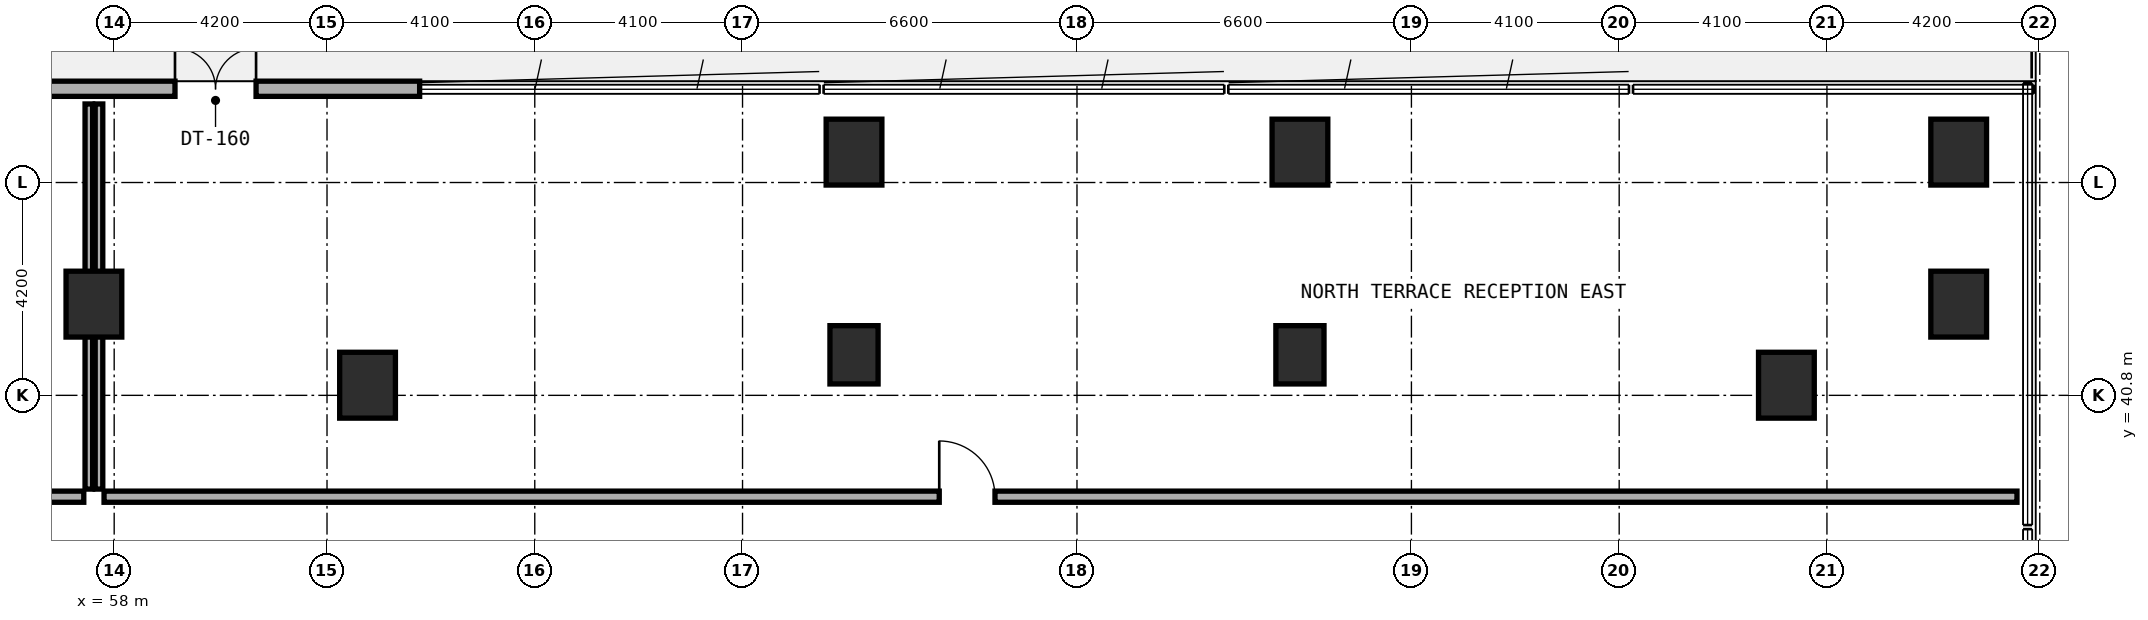
"""IFC4 building model, lengths in metres.
Left out: names, types, materials, properties, quantities, classifications, styles, units other than length and angle.
Written with IfcOpenShell. Run it as: python <this file> out.ifc"""

import sys

from ifc_helpers import new_model, si_unit, direction, frame, frame_2d, origin, origin_2d, place, context, subcontext, project, spatial, rectangle, extrude, element, fill, save


model = new_model("IFC4")
c1 = context("Model", 3, precision=1e-05, world=origin(), true_north=direction((0.0, 1.0)))
c2 = subcontext(c1, "Body", "Model", "MODEL_VIEW")
j1 = project(units=[si_unit("LENGTHUNIT", "METRE"), si_unit("PLANEANGLEUNIT", "RADIAN")], contexts=[c1])
p1 = place(None, origin())
s1 = spatial("IfcSite", under=j1, at=p1, CompositionType="ELEMENT")
p2 = place(p1, origin())
s2 = spatial("IfcBuilding", under=s1, at=p2, CompositionType="ELEMENT")
p3 = place(p2, frame((0.0, 0.0, 10.2)))
s3 = spatial("IfcBuildingStorey", under=s2, at=p3, CompositionType="ELEMENT", Elevation=10.2)
for number, where, z_axis, x_axis in (
    (1, (72.6, 41.6, 0.0), (0.0, 0.0, 1.0), (1.0, 0.0, 0.0)),
    (2, (81.4, 41.6, 0.0), (0.0, 0.0, 1.0), (1.0, 0.0, 0.0)),
):
    element("IfcColumn", number, at=place(p3, frame(where, z_axis=z_axis, x_axis=x_axis)), inside=s3, PredefinedType="COLUMN", context=c2, shape_type="SweptSolid", body=[
        extrude(rectangle(XDim=0.95, YDim=1.15, at=origin_2d()), origin(), (0.0, 0.0, 1.0), 4.8),
    ])
for number, where, z_axis, x_axis in (
    (3, (91.0, 41.0, 0.0), (0.0, 0.0, 1.0), (1.0, 0.0, 0.0)),
    (4, (63.0, 41.0, 0.0), (0.0, 0.0, 1.0), (1.0, 0.0, 0.0)),
    (5, (72.6, 45.6, 0.0), (0.0, 0.0, 1.0), (1.0, 0.0, 0.0)),
    (6, (81.4, 45.6, 0.0), (0.0, 0.0, 1.0), (1.0, 0.0, 0.0)),
    (7, (94.4, 45.6, 0.0), (0.0, 0.0, 1.0), (1.0, 0.0, 0.0)),
    (8, (57.6, 42.6, 0.0), (0.0, 0.0, 1.0), (1.0, 0.0, 0.0)),
    (9, (94.4, 42.6, 0.0), (0.0, 0.0, 1.0), (1.0, 0.0, 0.0)),
):
    element("IfcColumn", number, at=place(p3, frame(where, z_axis=z_axis, x_axis=x_axis)), inside=s3, PredefinedType="COLUMN", context=c2, shape_type="SweptSolid", body=[
        extrude(rectangle(XDim=1.1, YDim=1.3, at=origin_2d()), origin(), (0.0, 0.0, 1.0), 4.8),
    ])
p4 = place(p3, frame((64.028, 46.85, 0.0), z_axis=(0.0, 0.0, 1.0), x_axis=(-1.0, 0.0, 0.0)))
e10 = element("IfcWall", 10, at=p4, inside=s3, PredefinedType="STANDARD", context=c2, shape_type="SweptSolid", body=[
    extrude(rectangle(XDim=8.096, YDim=0.3, at=frame_2d((4.048, 0.0))), origin(), (0.0, 0.0, 1.0), 4.45),
])
p5 = place(p4, frame((3.228, 0.0, 0.0)))
e11 = element("IfcOpeningElement", 11, at=p5, cuts=e10, PredefinedType="OPENING", context=c2, shape_type="SweptSolid", body=[
    extrude(rectangle(XDim=1.6, YDim=2.2, at=frame_2d((0.8, 1.1))), frame((0.0, 0.16, 0.0), z_axis=(0.0, -1.0, 0.0), x_axis=(1.0, 0.0, 0.0)), (0.0, 0.0, 1.0), 0.32),
])
p6 = place(p3, frame((57.5, 38.95, 0.0), z_axis=(0.0, 0.0, 1.0), x_axis=(0.0, 1.0, 0.0)))
e12 = element("IfcWall", 12, at=p6, inside=s3, PredefinedType="PARTITIONING", context=c2, shape_type="SweptSolid", body=[
    extrude(rectangle(XDim=7.6, YDim=0.15, at=frame_2d((3.8, 0.0))), origin(), (0.0, 0.0, 1.0), 3.625),
])
p7 = place(p3, frame((40.1, 38.8, 0.0), z_axis=(0.0, 0.0, 1.0), x_axis=(1.0, 0.0, 0.0)))
e13 = element("IfcWall", 13, at=p7, inside=s3, PredefinedType="SOLIDWALL", context=c2, shape_type="SweptSolid", body=[
    extrude(rectangle(XDim=17.3, YDim=0.22, at=frame_2d((8.65, 0.0))), origin(), (0.0, 0.0, 1.0), 3.725),
])
p8 = place(p7, frame((7.28, 0.0, 0.0)))
e14 = element("IfcOpeningElement", 14, at=p8, cuts=e13, PredefinedType="OPENING", context=c2, shape_type="SweptSolid", body=[
    extrude(rectangle(XDim=1.1, YDim=2.1, at=frame_2d((0.55, 1.05))), frame((0.0, 0.12, 0.0), z_axis=(0.0, -1.0, 0.0), x_axis=(1.0, 0.0, 0.0)), (0.0, 0.0, 1.0), 0.24),
])
p9 = place(p3, frame((57.7, 38.95, 0.0), z_axis=(0.0, 0.0, 1.0), x_axis=(0.0, 1.0, 0.0)))
e15 = element("IfcWall", 15, at=p9, inside=s3, PredefinedType="PARTITIONING", context=c2, shape_type="SweptSolid", body=[
    extrude(rectangle(XDim=7.6, YDim=0.15, at=frame_2d((3.8, 0.0))), origin(), (0.0, 0.0, 1.0), 3.725),
])
p10 = place(p3, frame((57.8, 38.8, 0.0), z_axis=(0.0, 0.0, 1.0), x_axis=(1.0, 0.0, 0.0)))
e16 = element("IfcWall", 16, at=p10, inside=s3, PredefinedType="SOLIDWALL", context=c2, shape_type="SweptSolid", body=[
    extrude(rectangle(XDim=37.75, YDim=0.22, at=frame_2d((18.875, 0.0))), origin(), (0.0, 0.0, 1.0), 3.925),
])
p11 = place(p10, frame((16.482, 0.0, 0.0)))
e17 = element("IfcOpeningElement", 17, at=p11, cuts=e16, PredefinedType="OPENING", context=c2, shape_type="SweptSolid", body=[
    extrude(rectangle(XDim=1.1, YDim=2.1, at=frame_2d((0.55, 1.05))), frame((0.0, 0.12, 0.0), z_axis=(0.0, -1.0, 0.0), x_axis=(1.0, 0.0, 0.0)), (0.0, 0.0, 1.0), 0.24),
])
p12 = place(p5, frame((1.6, 0.0, 0.0), z_axis=(0.0, 0.0, 1.0), x_axis=(-1.0, 0.0, 0.0)))
e18 = element("IfcDoor", 18, at=p12, inside=s3, OperationType="DOUBLE_DOOR_SINGLE_SWING", PredefinedType="DOOR", context=c2, shape_type="SweptSolid", body=[
    extrude(rectangle(XDim=1.6, YDim=2.2, at=frame_2d((0.8, 1.1))), frame((0.0, 0.025, 0.0), z_axis=(0.0, -1.0, 0.0), x_axis=(1.0, 0.0, 0.0)), (0.0, 0.0, 1.0), 0.05),
])
fill(e11, e18)
p13 = place(p11, origin())
e19 = element("IfcDoor", 19, at=p13, inside=s3, OperationType="SINGLE_SWING_LEFT", PredefinedType="DOOR", context=c2, shape_type="SweptSolid", body=[
    extrude(rectangle(XDim=1.1, YDim=2.1, at=frame_2d((0.55, 1.05))), frame((0.0, 0.025, 0.0), z_axis=(0.0, -1.0, 0.0), x_axis=(1.0, 0.0, 0.0)), (0.0, 0.0, 1.0), 0.05),
])
fill(e17, e19)
save(model, sys.argv[1])
